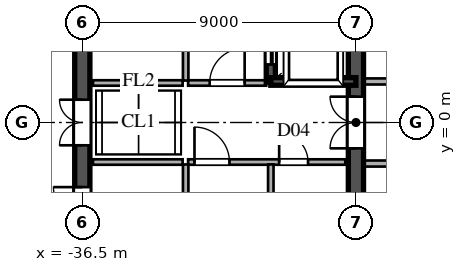
"""IFC4 building model, lengths in metres.
Left out: names, types, materials, properties, quantities, classifications, styles, units other than length and angle.
Written with IfcOpenShell. Run it as: python <this file> out.ifc"""

import sys

from ifc_helpers import new_model, si_unit, direction, frame, frame_2d, origin, place, context, subcontext, project, spatial, rectangle, extrude, source, transform, mapped, element, fill, save


model = new_model("IFC4")
c1 = context("Model", 3, precision=1e-05, world=origin(), true_north=direction((0.0, 1.0)))
c2 = subcontext(c1, "Body", "Model", "MODEL_VIEW")
j1 = project(units=[si_unit("LENGTHUNIT", "METRE"), si_unit("PLANEANGLEUNIT", "RADIAN")], contexts=[c1])
p1 = place(None, origin())
s1 = spatial("IfcSite", under=j1, at=p1, CompositionType="ELEMENT")
p2 = place(p1, origin())
s2 = spatial("IfcBuilding", under=s1, at=p2, CompositionType="ELEMENT")
p3 = place(p2, frame((0.0, 0.0, 258.15)))
s3 = spatial("IfcBuildingStorey", under=s2, at=p3, CompositionType="ELEMENT", Elevation=258.15)
for number, where, z_axis, x_axis in (
    (1, (-27.5, -13.5, 0.0), (0.0, 0.0, 1.0), (0.0, 1.0, 0.0)),
    (2, (-27.5, 1.3, 0.0), (0.0, 0.0, 1.0), (0.0, 1.0, 0.0)),
):
    element("IfcWall", number, at=place(p3, frame(where, z_axis=z_axis, x_axis=x_axis)), inside=s3, PredefinedType="SHEAR", context=c2, shape_type="SweptSolid", body=[
        extrude(rectangle(XDim=12.2, YDim=0.5, at=frame_2d((6.1, 0.0))), origin(), (0.0, 0.0, 1.0), 3.53),
    ])
p4 = place(p3, frame((-27.5, -1.3, 0.0), z_axis=(0.0, 0.0, 1.0), x_axis=(0.0, 1.0, 0.0)))
e3 = element("IfcWall", 3, at=p4, inside=s3, PredefinedType="SHEAR", context=c2, shape_type="SweptSolid", body=[
    extrude(rectangle(XDim=2.6, YDim=0.5, at=frame_2d((1.3, 0.0))), origin(), (0.0, 0.0, 1.0), 3.53),
])
p5 = place(p4, frame((0.45, 0.0, 0.0)))
e4 = element("IfcOpeningElement", 4, at=p5, cuts=e3, PredefinedType="OPENING", context=c2, shape_type="SweptSolid", body=[
    extrude(rectangle(XDim=1.7, YDim=2.35, at=frame_2d((0.85, 1.175))), frame((0.0, 0.26, 0.0), z_axis=(0.0, -1.0, 0.0), x_axis=(1.0, 0.0, 0.0)), (0.0, 0.0, 1.0), 0.52),
])
p6 = place(p3, frame((-36.5, -1.3, 0.0), z_axis=(0.0, 0.0, 1.0), x_axis=(0.0, 1.0, 0.0)))
e5 = element("IfcWall", 5, at=p6, inside=s3, PredefinedType="SHEAR", context=c2, shape_type="SweptSolid", body=[
    extrude(rectangle(XDim=2.6, YDim=0.5, at=frame_2d((1.3, 0.0))), origin(), (0.0, 0.0, 1.0), 3.53),
])
p7 = place(p6, frame((0.55, 0.0, 0.0)))
e6 = element("IfcOpeningElement", 6, at=p7, cuts=e5, PredefinedType="OPENING", context=c2, shape_type="SweptSolid", body=[
    extrude(rectangle(XDim=1.5, YDim=2.3, at=frame_2d((0.75, 1.15))), frame((0.0, 0.26, 0.0), z_axis=(0.0, -1.0, 0.0), x_axis=(1.0, 0.0, 0.0)), (0.0, 0.0, 1.0), 0.52),
])
p8 = place(p3, frame((-36.5, -3.9, 0.0), z_axis=(0.0, 0.0, 1.0), x_axis=(0.0, 1.0, 0.0)))
e7 = element("IfcWall", 7, at=p8, inside=s3, PredefinedType="SHEAR", context=c2, shape_type="SweptSolid", body=[
    extrude(rectangle(XDim=2.6, YDim=0.5, at=frame_2d((1.3, 0.0))), origin(), (0.0, 0.0, 1.0), 3.53),
])
p9 = place(p8, frame((0.825, 0.0, 0.0)))
e8 = element("IfcOpeningElement", 8, at=p9, cuts=e7, PredefinedType="OPENING", context=c2, shape_type="SweptSolid", body=[
    extrude(rectangle(XDim=0.95, YDim=2.15, at=frame_2d((0.475, 1.075))), frame((0.0, 0.26, 0.0), z_axis=(0.0, -1.0, 0.0), x_axis=(1.0, 0.0, 0.0)), (0.0, 0.0, 1.0), 0.52),
])
p10 = place(p3, frame((-36.5, 1.3, 0.0), z_axis=(0.0, 0.0, 1.0), x_axis=(0.0, 1.0, 0.0)))
e9 = element("IfcWall", 9, at=p10, inside=s3, PredefinedType="SHEAR", context=c2, shape_type="SweptSolid", body=[
    extrude(rectangle(XDim=3.45, YDim=0.5, at=frame_2d((1.725, 0.0))), origin(), (0.0, 0.0, 1.0), 3.53),
])
p11 = place(p10, frame((1.25, 0.0, 0.0)))
e10 = element("IfcOpeningElement", 10, at=p11, cuts=e9, PredefinedType="OPENING", context=c2, shape_type="SweptSolid", body=[
    extrude(rectangle(XDim=0.95, YDim=2.15, at=frame_2d((0.475, 1.075))), frame((0.0, 0.26, 0.0), z_axis=(0.0, -1.0, 0.0), x_axis=(1.0, 0.0, 0.0)), (0.0, 0.0, 1.0), 0.52),
])
p12 = place(p3, frame((-30.3, 1.35, 0.0), z_axis=(0.0, 0.0, 1.0), x_axis=(1.0, 0.0, 0.0)))
e11 = element("IfcWall", 11, at=p12, inside=s3, PredefinedType="SHEAR", context=c2, shape_type="SweptSolid", body=[
    extrude(rectangle(XDim=2.8, YDim=0.25, at=frame_2d((1.4, 0.0))), origin(), (0.0, 0.0, 1.0), 3.53),
])
p13 = place(p3, frame((-30.3, 1.32, 0.0), z_axis=(0.0, 0.0, 1.0), x_axis=(0.0, 1.0, 0.0)))
e12 = element("IfcWall", 12, at=p13, inside=s3, PredefinedType="SHEAR", context=c2, shape_type="SweptSolid", body=[
    extrude(rectangle(XDim=2.28, YDim=0.3, at=frame_2d((1.14, 0.0))), origin(), (0.0, 0.0, 1.0), 3.53),
])
p14 = place(p13, frame((0.59, 0.0, 0.0)))
e13 = element("IfcOpeningElement", 13, at=p14, cuts=e12, PredefinedType="OPENING", context=c2, shape_type="SweptSolid", body=[
    extrude(rectangle(XDim=1.1, YDim=2.2, at=frame_2d((0.55, 1.1))), frame((0.0, 0.16, 0.0), z_axis=(0.0, -1.0, 0.0), x_axis=(1.0, 0.0, 0.0)), (0.0, 0.0, 1.0), 0.32),
])
p15 = place(p3, frame((-33.1, -6.42, 0.0), z_axis=(0.0, 0.0, 1.0), x_axis=(0.0, 1.0, 0.0)))
e14 = element("IfcWall", 14, at=p15, inside=s3, PredefinedType="PARTITIONING", context=c2, shape_type="SweptSolid", body=[
    extrude(rectangle(XDim=5.04, YDim=0.18, at=frame_2d((2.52, 0.0))), origin(), (0.0, 0.0, 1.0), 3.53),
])
p16 = place(p3, frame((-33.1, 1.38, 0.0), z_axis=(0.0, 0.0, 1.0), x_axis=(0.0, 1.0, 0.0)))
e15 = element("IfcWall", 15, at=p16, inside=s3, PredefinedType="PARTITIONING", context=c2, shape_type="SweptSolid", body=[
    extrude(rectangle(XDim=6.74, YDim=0.18, at=frame_2d((3.37, 0.0))), origin(), (0.0, 0.0, 1.0), 3.53),
])
p17 = place(p3, frame((-30.3, -1.3, 0.0), z_axis=(0.0, 0.0, 1.0), x_axis=(1.0, 0.0, 0.0)))
e16 = element("IfcWall", 16, at=p17, inside=s3, PredefinedType="PARTITIONING", context=c2, shape_type="SweptSolid", body=[
    extrude(rectangle(XDim=2.45, YDim=0.18, at=frame_2d((1.225, 0.0))), origin(), (0.0, 0.0, 1.0), 3.53),
])
p18 = place(p17, frame((0.275, 0.0, 0.0)))
e17 = element("IfcOpeningElement", 17, at=p18, cuts=e16, PredefinedType="OPENING", context=c2, shape_type="SweptSolid", body=[
    extrude(rectangle(XDim=0.95, YDim=2.15, at=frame_2d((0.475, 1.075))), frame((0.0, 0.1, 0.0), z_axis=(0.0, -1.0, 0.0), x_axis=(1.0, 0.0, 0.0)), (0.0, 0.0, 1.0), 0.2),
])
p19 = place(p3, frame((-33.02, -1.3, 0.0), z_axis=(0.0, 0.0, 1.0), x_axis=(1.0, 0.0, 0.0)))
e18 = element("IfcWall", 18, at=p19, inside=s3, PredefinedType="PARTITIONING", context=c2, shape_type="SweptSolid", body=[
    extrude(rectangle(XDim=2.72, YDim=0.18, at=frame_2d((1.36, 0.0))), origin(), (0.0, 0.0, 1.0), 3.53),
])
p20 = place(p19, frame((0.21, 0.0, 0.0)))
e19 = element("IfcOpeningElement", 19, at=p20, cuts=e18, PredefinedType="OPENING", context=c2, shape_type="SweptSolid", body=[
    extrude(rectangle(XDim=1.15, YDim=2.2, at=frame_2d((0.575, 1.1))), frame((0.0, 0.1, 0.0), z_axis=(0.0, -1.0, 0.0), x_axis=(1.0, 0.0, 0.0)), (0.0, 0.0, 1.0), 0.2),
])
p21 = place(p3, frame((-30.3, -7.12, 0.0), z_axis=(0.0, 0.0, 1.0), x_axis=(0.0, 1.0, 0.0)))
e20 = element("IfcWall", 20, at=p21, inside=s3, PredefinedType="PARTITIONING", context=c2, shape_type="SweptSolid", body=[
    extrude(rectangle(XDim=5.74, YDim=0.18, at=frame_2d((2.87, 0.0))), origin(), (0.0, 0.0, 1.0), 3.53),
])
p22 = place(p3, frame((-33.02, 1.3, 0.0), z_axis=(0.0, 0.0, 1.0), x_axis=(1.0, 0.0, 0.0)))
e21 = element("IfcWall", 21, at=p22, inside=s3, PredefinedType="PARTITIONING", context=c2, shape_type="SweptSolid", body=[
    extrude(rectangle(XDim=2.57, YDim=0.18, at=frame_2d((1.285, 0.0))), origin(), (0.0, 0.0, 1.0), 3.53),
])
p23 = place(p22, frame((0.71, 0.0, 0.0)))
e22 = element("IfcOpeningElement", 22, at=p23, cuts=e21, PredefinedType="OPENING", context=c2, shape_type="SweptSolid", body=[
    extrude(rectangle(XDim=1.15, YDim=2.2, at=frame_2d((0.575, 1.1))), frame((0.0, 0.1, 0.0), z_axis=(0.0, -1.0, 0.0), x_axis=(1.0, 0.0, 0.0)), (0.0, 0.0, 1.0), 0.2),
])
for number, where, z_axis, x_axis in (
    (23, (-36.15, -1.3, 0.0), (0.0, 0.0, 1.0), (1.0, 0.0, 0.0)),
    (24, (-36.15, 1.3, 0.0), (0.0, 0.0, 1.0), (1.0, 0.0, 0.0)),
):
    element("IfcWall", number, at=place(p3, frame(where, z_axis=z_axis, x_axis=x_axis)), inside=s3, PredefinedType="PARTITIONING", context=c2, shape_type="SweptSolid", body=[
        extrude(rectangle(XDim=2.95, YDim=0.18, at=frame_2d((1.475, 0.0))), origin(), (0.0, 0.0, 1.0), 3.53),
    ])
p24 = place(p3, frame((-27.245, -1.35, 0.0), z_axis=(0.0, 0.0, 1.0), x_axis=(1.0, 0.0, 0.0)))
e25 = element("IfcWall", 25, at=p24, inside=s3, PredefinedType="PARTITIONING", context=c2, shape_type="SweptSolid", body=[
    extrude(rectangle(XDim=19.66, YDim=0.2, at=frame_2d((9.83, 0.0))), origin(), (0.0, 0.0, 1.0), 3.53),
])
p25 = place(p24, frame((12.97, 0.0, 0.0)))
e26 = element("IfcOpeningElement", 26, at=p25, cuts=e25, PredefinedType="OPENING", context=c2, shape_type="SweptSolid", body=[
    extrude(rectangle(XDim=1.05, YDim=2.25, at=frame_2d((0.525, 1.125))), frame((0.0, 0.11, 0.0), z_axis=(0.0, -1.0, 0.0), x_axis=(1.0, 0.0, 0.0)), (0.0, 0.0, 1.0), 0.22),
])
p26 = place(p3, frame((-27.245, 1.35, 0.0), z_axis=(0.0, 0.0, 1.0), x_axis=(1.0, 0.0, 0.0)))
e27 = element("IfcWall", 27, at=p26, inside=s3, PredefinedType="PARTITIONING", context=c2, shape_type="SweptSolid", body=[
    extrude(rectangle(XDim=19.66, YDim=0.2, at=frame_2d((9.83, 0.0))), origin(), (0.0, 0.0, 1.0), 3.53),
])
p27 = place(p26, frame((12.97, 0.0, 0.0)))
e28 = element("IfcOpeningElement", 28, at=p27, cuts=e27, PredefinedType="OPENING", context=c2, shape_type="SweptSolid", body=[
    extrude(rectangle(XDim=1.05, YDim=2.25, at=frame_2d((0.525, 1.125))), frame((0.0, 0.11, 0.0), z_axis=(0.0, -1.0, 0.0), x_axis=(1.0, 0.0, 0.0)), (0.0, 0.0, 1.0), 0.22),
])
m1 = source(origin(), c2, "Body", "SweptSolid", [
    extrude(rectangle(XDim=1.7, YDim=2.35, at=frame_2d((0.85, 1.175))), frame((0.0, 0.025, 0.0), z_axis=(0.0, -1.0, 0.0), x_axis=(1.0, 0.0, 0.0)), (0.0, 0.0, 1.0), 0.05),
])
p28 = place(p5, origin())
e29 = element("IfcDoor", 29, at=p28, inside=s3, OperationType="DOUBLE_SWING_LEFT", PredefinedType="DOOR", context=c2, shape_type="MappedRepresentation", body=[
    mapped(m1, transform((0.0, 0.0, 0.0), scale=1.0)),
])
fill(e4, e29)
m2 = source(origin(), c2, "Body", "SweptSolid", [
    extrude(rectangle(XDim=1.5, YDim=2.3, at=frame_2d((0.75, 1.15))), frame((0.0, 0.025, 0.0), z_axis=(0.0, -1.0, 0.0), x_axis=(1.0, 0.0, 0.0)), (0.0, 0.0, 1.0), 0.05),
])
p29 = place(p7, origin())
e30 = element("IfcDoor", 30, at=p29, inside=s3, OperationType="DOUBLE_SWING_LEFT", PredefinedType="DOOR", context=c2, shape_type="MappedRepresentation", body=[
    mapped(m2, transform((0.0, 0.0, 0.0), scale=1.0)),
])
fill(e6, e30)
m3 = source(origin(), c2, "Body", "SweptSolid", [
    extrude(rectangle(XDim=0.95, YDim=2.15, at=frame_2d((0.475, 1.075))), frame((0.0, 0.025, 0.0), z_axis=(0.0, -1.0, 0.0), x_axis=(1.0, 0.0, 0.0)), (0.0, 0.0, 1.0), 0.05),
])
p30 = place(p9, origin())
e31 = element("IfcDoor", 31, at=p30, inside=s3, OperationType="SINGLE_SWING_RIGHT", PredefinedType="DOOR", context=c2, shape_type="MappedRepresentation", body=[
    mapped(m3, transform((0.0, 0.0, 0.0), scale=1.0)),
])
fill(e8, e31)
m4 = source(origin(), c2, "Body", "SweptSolid", [
    extrude(rectangle(XDim=1.1, YDim=2.2, at=frame_2d((0.55, 1.1))), frame((0.0, 0.025, 0.0), z_axis=(0.0, -1.0, 0.0), x_axis=(1.0, 0.0, 0.0)), (0.0, 0.0, 1.0), 0.05),
])
p31 = place(p14, origin())
e32 = element("IfcDoor", 32, at=p31, inside=s3, OperationType="DOUBLE_DOOR_SLIDING", PredefinedType="DOOR", context=c2, shape_type="MappedRepresentation", body=[
    mapped(m4, transform((0.0, 0.0, 0.0), scale=1.0)),
])
fill(e13, e32)
p32 = place(p18, origin())
e33 = element("IfcDoor", 33, at=p32, inside=s3, OperationType="SINGLE_SWING_LEFT", PredefinedType="DOOR", context=c2, shape_type="MappedRepresentation", body=[
    mapped(m3, transform((0.0, 0.0, 0.0), scale=1.0)),
])
fill(e17, e33)
m5 = source(origin(), c2, "Body", "SweptSolid", [
    extrude(rectangle(XDim=1.15, YDim=2.2, at=frame_2d((0.575, 1.1))), frame((0.0, 0.025, 0.0), z_axis=(0.0, -1.0, 0.0), x_axis=(1.0, 0.0, 0.0)), (0.0, 0.0, 1.0), 0.05),
])
p33 = place(p20, origin())
e34 = element("IfcDoor", 34, at=p33, inside=s3, OperationType="SINGLE_SWING_LEFT", PredefinedType="DOOR", context=c2, shape_type="MappedRepresentation", body=[
    mapped(m5, transform((0.0, 0.0, 0.0), scale=1.0)),
])
fill(e19, e34)
p34 = place(p23, origin())
e35 = element("IfcDoor", 35, at=p34, inside=s3, OperationType="SINGLE_SWING_RIGHT", PredefinedType="DOOR", context=c2, shape_type="MappedRepresentation", body=[
    mapped(m5, transform((0.0, 0.0, 0.0), scale=1.0)),
])
fill(e22, e35)
save(model, sys.argv[1])
